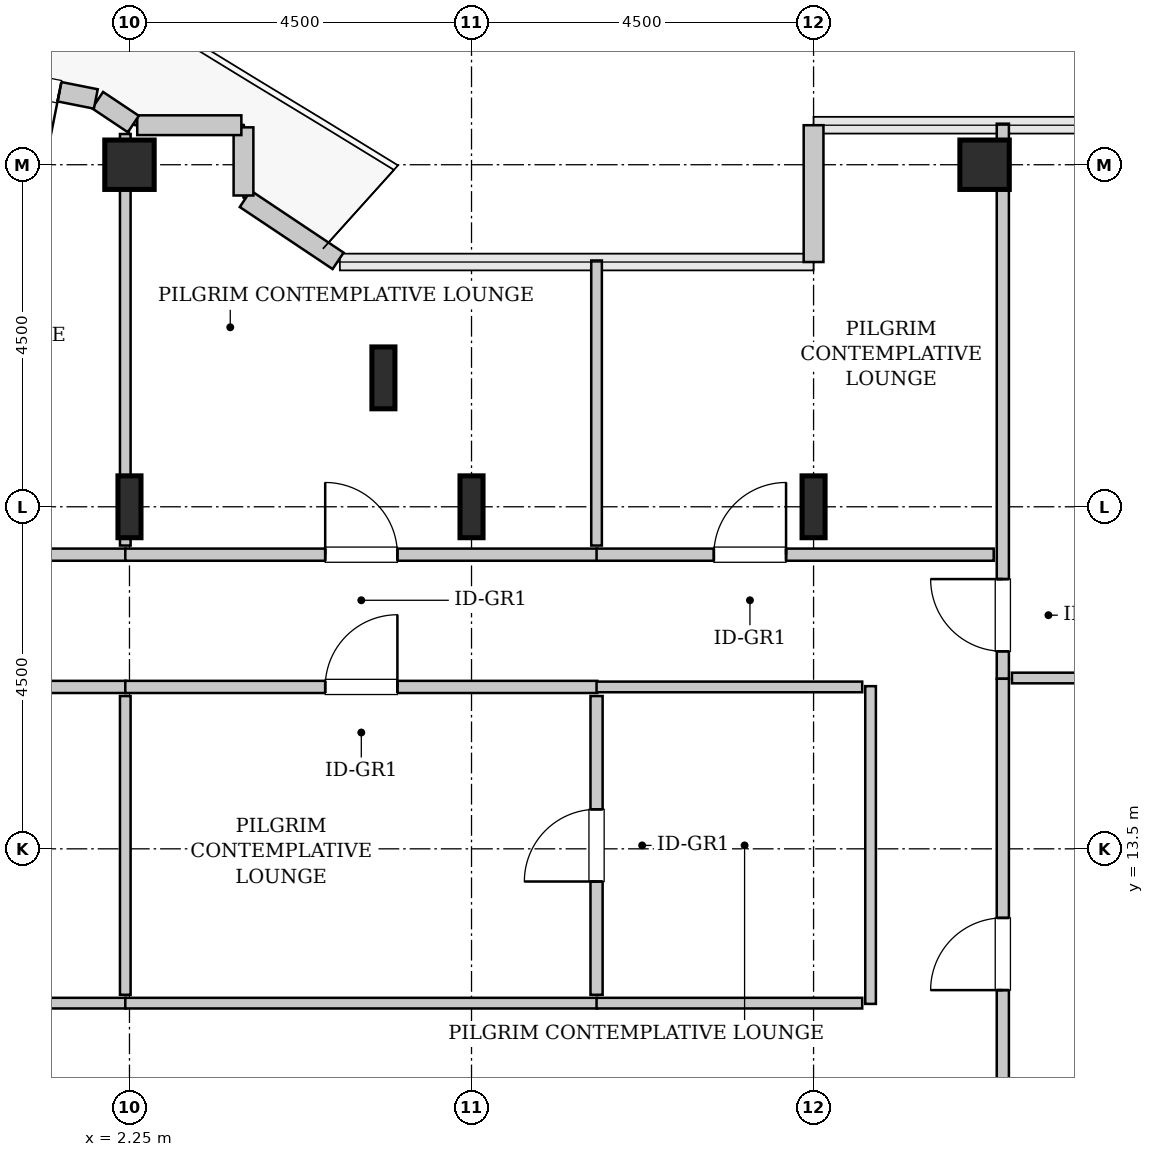
"""IFC4 building model, lengths in metres.
Left out: names, types, materials, properties, quantities, classifications, styles, units other than length and angle.
Written with IfcOpenShell. Run it as: python <this file> out.ifc"""

import sys

from ifc_helpers import new_model, si_unit, direction, frame, frame_2d, origin, origin_2d, place, context, subcontext, project, spatial, rectangle, hollow_rectangle, i_section, extrude, source, transform, mapped, element, fill, save


model = new_model("IFC4")
c1 = context("Model", 3, precision=1e-05, world=origin(), true_north=direction((0.0, 1.0)))
c2 = subcontext(c1, "Body", "Model", "MODEL_VIEW")
j1 = project(units=[si_unit("LENGTHUNIT", "METRE"), si_unit("PLANEANGLEUNIT", "RADIAN")], contexts=[c1])
p1 = place(None, origin())
s1 = spatial("IfcSite", under=j1, at=p1, CompositionType="ELEMENT")
p2 = place(p1, origin())
s2 = spatial("IfcBuilding", under=s1, at=p2, CompositionType="ELEMENT")
p3 = place(p2, frame((0.0, 0.0, 248.4)))
s3 = spatial("IfcBuildingStorey", under=s2, at=p3, CompositionType="ELEMENT", Elevation=248.4)
m1 = source(origin(), c2, "Body", "SweptSolid", [
    extrude(i_section(OverallWidth=0.303, OverallDepth=0.814, WebThickness=0.021, FlangeThickness=0.04, FilletRadius=0.03, at=origin_2d()), origin(), (0.0, 0.0, 1.0), 3.8),
])
p4 = place(p3, frame((2.25, 18.0, 0.0), z_axis=(0.0, 0.0, 1.0), x_axis=(1.0, 0.0, 0.0)))
e1 = element("IfcColumn", 1, at=p4, inside=s3, PredefinedType="COLUMN", context=c2, shape_type="MappedRepresentation", body=[
    mapped(m1, transform((0.0, 0.0, 0.0), x_axis=(1.0, 0.0, 0.0), y_axis=(0.0, 1.0, 0.0), z_axis=(0.0, 0.0, 1.0), scale=1.0)),
])
m2 = source(origin(), c2, "Body", "SweptSolid", [
    extrude(hollow_rectangle(XDim=0.65, YDim=0.65, WallThickness=0.032, InnerFilletRadius=0.032, OuterFilletRadius=0.064, at=origin_2d()), origin(), (0.0, 0.0, 1.0), 3.8),
])
p5 = place(p3, frame((2.25, 22.5, 0.0), z_axis=(0.0, 0.0, 1.0), x_axis=(1.0, 0.0, 0.0)))
e2 = element("IfcColumn", 2, at=p5, inside=s3, PredefinedType="COLUMN", context=c2, shape_type="MappedRepresentation", body=[
    mapped(m2, transform((0.0, 0.0, 0.0), x_axis=(1.0, 0.0, 0.0), y_axis=(0.0, 1.0, 0.0), z_axis=(0.0, 0.0, 1.0), scale=1.0)),
])
for number, where, z_axis, x_axis in (
    (3, (5.591, 19.696, 0.0), (0.0, 0.0, 1.0), (1.0, 0.0, 0.0)),
    (4, (6.75, 18.0, 0.0), (0.0, 0.0, 1.0), (1.0, 0.0, 0.0)),
    (5, (11.25, 18.0, 0.0), (0.0, 0.0, 1.0), (1.0, 0.0, 0.0)),
):
    element("IfcColumn", number, at=place(p3, frame(where, z_axis=z_axis, x_axis=x_axis)), inside=s3, PredefinedType="COLUMN", context=c2, shape_type="MappedRepresentation", body=[
        mapped(m1, transform((0.0, 0.0, 0.0), x_axis=(1.0, 0.0, 0.0), y_axis=(0.0, 1.0, 0.0), z_axis=(0.0, 0.0, 1.0), scale=1.0)),
    ])
p6 = place(p3, frame((13.5, 22.5, 0.0), z_axis=(0.0, 0.0, 1.0), x_axis=(1.0, 0.0, 0.0)))
e6 = element("IfcColumn", 6, at=p6, inside=s3, PredefinedType="COLUMN", context=c2, shape_type="MappedRepresentation", body=[
    mapped(m2, transform((0.0, 0.0, 0.0), x_axis=(1.0, 0.0, 0.0), y_axis=(0.0, 1.0, 0.0), z_axis=(0.0, 0.0, 1.0), scale=1.0)),
])
m3 = source(origin(), c2, "Body", "SweptSolid", [
    extrude(rectangle(XDim=1.8, YDim=0.26, at=frame_2d((0.9, 0.0))), origin(), (0.0, 0.0, 1.0), 3.55),
])
p7 = place(p3, frame((11.25, 23.02, 0.0), z_axis=(0.0, 0.0, 1.0), x_axis=(0.0, -1.0, 0.0)))
e7 = element("IfcWall", 7, at=p7, inside=s3, PredefinedType="SOLIDWALL", context=c2, shape_type="MappedRepresentation", body=[
    mapped(m3, transform((0.0, 0.0, 0.0), x_axis=(1.0, 0.0, 0.0), y_axis=(0.0, 1.0, 0.0), z_axis=(0.0, 0.0, 1.0), scale=1.0)),
])
m4 = source(origin(), c2, "Body", "SweptSolid", [
    extrude(rectangle(XDim=1.469, YDim=0.26, at=frame_2d((0.734, 0.0))), origin(), (0.0, 0.0, 1.0), 3.55),
])
p8 = place(p3, frame((4.995, 21.236, 0.0), z_axis=(0.0, 0.0, 1.0), x_axis=(-0.831461760506, 0.555581983884, 0.0)))
e8 = element("IfcWall", 8, at=p8, inside=s3, PredefinedType="SOLIDWALL", context=c2, shape_type="MappedRepresentation", body=[
    mapped(m4, transform((0.0, 0.0, 0.0), x_axis=(1.0, 0.0, 0.0), y_axis=(0.0, 1.0, 0.0), z_axis=(0.0, 0.0, 1.0), scale=1.0)),
])
m5 = source(origin(), c2, "Body", "SweptSolid", [
    extrude(rectangle(XDim=0.897, YDim=0.26, at=frame_2d((0.448, 0.0))), origin(), (0.0, 0.0, 1.0), 3.55),
])
p9 = place(p3, frame((3.75, 22.095, 0.0), z_axis=(0.0, 0.0, 1.0), x_axis=(0.0, 1.0, 0.0)))
e9 = element("IfcWall", 9, at=p9, inside=s3, PredefinedType="SOLIDWALL", context=c2, shape_type="MappedRepresentation", body=[
    mapped(m5, transform((0.0, 0.0, 0.0), x_axis=(1.0, 0.0, 0.0), y_axis=(0.0, 1.0, 0.0), z_axis=(0.0, 0.0, 1.0), scale=1.0)),
])
m6 = source(origin(), c2, "Body", "SweptSolid", [
    extrude(rectangle(XDim=1.37, YDim=0.26, at=frame_2d((0.685, 0.0))), origin(), (0.0, 0.0, 1.0), 3.55),
])
p10 = place(p3, frame((3.722, 23.02, 0.0), z_axis=(0.0, 0.0, 1.0), x_axis=(-1.0, 0.0, 0.0)))
e10 = element("IfcWall", 10, at=p10, inside=s3, PredefinedType="SOLIDWALL", context=c2, shape_type="MappedRepresentation", body=[
    mapped(m6, transform((0.0, 0.0, 0.0), x_axis=(1.0, 0.0, 0.0), y_axis=(0.0, 1.0, 0.0), z_axis=(0.0, 0.0, 1.0), scale=1.0)),
])
m7 = source(origin(), c2, "Body", "SweptSolid", [
    extrude(rectangle(XDim=0.565, YDim=0.26, at=frame_2d((0.283, 0.0))), origin(), (0.0, 0.0, 1.0), 3.55),
])
p11 = place(p3, frame((2.301, 23.036, 0.0), z_axis=(0.0, 0.0, 1.0), x_axis=(-0.831651492666, 0.555297933317, 0.0)))
e11 = element("IfcWall", 11, at=p11, inside=s3, PredefinedType="SOLIDWALL", context=c2, shape_type="MappedRepresentation", body=[
    mapped(m7, transform((0.0, 0.0, 0.0), x_axis=(1.0, 0.0, 0.0), y_axis=(0.0, 1.0, 0.0), z_axis=(0.0, 0.0, 1.0), scale=1.0)),
])
m8 = source(origin(), c2, "Body", "SweptSolid", [
    extrude(rectangle(XDim=4.137, YDim=0.26, at=frame_2d((2.068, 0.0))), origin(), (0.0, 0.0, 1.0), 3.55),
])
p12 = place(p3, frame((1.807, 23.365, 0.0), z_axis=(0.0, 0.0, 1.0), x_axis=(-0.980782170794, 0.195105954428, 0.0)))
e12 = element("IfcWall", 12, at=p12, inside=s3, PredefinedType="SOLIDWALL", context=c2, shape_type="MappedRepresentation", body=[
    mapped(m8, transform((0.0, 0.0, 0.0), x_axis=(1.0, 0.0, 0.0), y_axis=(0.0, 1.0, 0.0), z_axis=(0.0, 0.0, 1.0), scale=1.0)),
])
p13 = place(p12, frame((0.488, 0.0, 0.0)))
e13 = element("IfcOpeningElement", 13, at=p13, cuts=e12, PredefinedType="OPENING", context=c2, shape_type="SweptSolid", body=[
    extrude(rectangle(XDim=1.1, YDim=2.2, at=frame_2d((0.55, 1.1))), frame((0.0, 0.14, 0.0), z_axis=(0.0, -1.0, 0.0), x_axis=(1.0, 0.0, 0.0)), (0.0, 0.0, 1.0), 0.28),
])
m9 = source(origin(), c2, "Body", "SweptSolid", [
    extrude(rectangle(XDim=7.302, YDim=0.16, at=frame_2d((3.651, 0.0))), origin(), (0.0, 0.0, 1.0), 3.535),
])
p14 = place(p3, frame((13.74, 15.738, 0.0), z_axis=(0.0, 0.0, 1.0), x_axis=(0.0, 1.0, 0.0)))
e14 = element("IfcWall", 14, at=p14, inside=s3, PredefinedType="PARTITIONING", context=c2, shape_type="MappedRepresentation", body=[
    mapped(m9, transform((0.0, 0.0, 0.0), x_axis=(1.0, 0.0, 0.0), y_axis=(0.0, 1.0, 0.0), z_axis=(0.0, 0.0, 1.0), scale=1.0)),
])
p15 = place(p14, frame((0.361, 0.0, 0.0)))
e15 = element("IfcOpeningElement", 15, at=p15, cuts=e14, PredefinedType="OPENING", context=c2, shape_type="SweptSolid", body=[
    extrude(rectangle(XDim=0.95, YDim=2.1, at=frame_2d((0.475, 1.05))), frame((0.0, 0.09, 0.0), z_axis=(0.0, -1.0, 0.0), x_axis=(1.0, 0.0, 0.0)), (0.0, 0.0, 1.0), 0.18),
])
m10 = source(origin(), c2, "Body", "SweptSolid", [
    extrude(rectangle(XDim=11.43, YDim=0.14, at=frame_2d((5.715, 0.0))), origin(), (0.0, 0.0, 1.0), 3.535),
])
p16 = place(p3, frame((13.86, 15.748, 0.0), z_axis=(0.0, 0.0, 1.0), x_axis=(1.0, 0.0, 0.0)))
e16 = element("IfcWall", 16, at=p16, inside=s3, PredefinedType="PARTITIONING", context=c2, shape_type="MappedRepresentation", body=[
    mapped(m10, transform((0.0, 0.0, 0.0), x_axis=(1.0, 0.0, 0.0), y_axis=(0.0, 1.0, 0.0), z_axis=(0.0, 0.0, 1.0), scale=1.0)),
])
m11 = source(origin(), c2, "Body", "SweptSolid", [
    extrude(rectangle(XDim=7.242, YDim=0.16, at=frame_2d((3.621, 0.0))), origin(), (0.0, 0.0, 1.0), 3.535),
])
p17 = place(p3, frame((13.74, 8.495, 0.0), z_axis=(0.0, 0.0, 1.0), x_axis=(0.0, 1.0, 0.0)))
e17 = element("IfcWall", 17, at=p17, inside=s3, PredefinedType="PARTITIONING", context=c2, shape_type="MappedRepresentation", body=[
    mapped(m11, transform((0.0, 0.0, 0.0), x_axis=(1.0, 0.0, 0.0), y_axis=(0.0, 1.0, 0.0), z_axis=(0.0, 0.0, 1.0), scale=1.0)),
])
p18 = place(p17, frame((3.146, 0.0, 0.0)))
e18 = element("IfcOpeningElement", 18, at=p18, cuts=e17, PredefinedType="OPENING", context=c2, shape_type="SweptSolid", body=[
    extrude(rectangle(XDim=0.95, YDim=2.1, at=frame_2d((0.475, 1.05))), frame((0.0, 0.09, 0.0), z_axis=(0.0, -1.0, 0.0), x_axis=(1.0, 0.0, 0.0)), (0.0, 0.0, 1.0), 0.18),
])
m12 = source(origin(), c2, "Body", "SweptSolid", [
    extrude(rectangle(XDim=7.21, YDim=0.16, at=frame_2d((3.605, 0.0))), origin(), (0.0, 0.0, 1.0), 3.535),
])
p19 = place(p3, frame((-5.005, 17.37, 0.0), z_axis=(0.0, 0.0, 1.0), x_axis=(1.0, 0.0, 0.0)))
e19 = element("IfcWall", 19, at=p19, inside=s3, PredefinedType="PARTITIONING", context=c2, shape_type="MappedRepresentation", body=[
    mapped(m12, transform((0.0, 0.0, 0.0), x_axis=(1.0, 0.0, 0.0), y_axis=(0.0, 1.0, 0.0), z_axis=(0.0, 0.0, 1.0), scale=1.0)),
])
p20 = place(p19, frame((3.13, 0.0, 0.0)))
e20 = element("IfcOpeningElement", 20, at=p20, cuts=e19, PredefinedType="OPENING", context=c2, shape_type="SweptSolid", body=[
    extrude(rectangle(XDim=0.95, YDim=2.1, at=frame_2d((0.475, 1.05))), frame((0.0, 0.09, 0.0), z_axis=(0.0, -1.0, 0.0), x_axis=(1.0, 0.0, 0.0)), (0.0, 0.0, 1.0), 0.18),
])
m13 = source(origin(), c2, "Body", "SweptSolid", [
    extrude(rectangle(XDim=5.414, YDim=0.14, at=frame_2d((2.707, 0.0))), origin(), (0.0, 0.0, 1.0), 2.925),
])
p21 = place(p3, frame((2.195, 17.49, 0.0), z_axis=(0.0, 0.0, 1.0), x_axis=(0.0, 1.0, 0.0)))
e21 = element("IfcWall", 21, at=p21, inside=s3, PredefinedType="PARTITIONING", context=c2, shape_type="MappedRepresentation", body=[
    mapped(m13, transform((0.0, 0.0, 0.0), x_axis=(1.0, 0.0, 0.0), y_axis=(0.0, 1.0, 0.0), z_axis=(0.0, 0.0, 1.0), scale=1.0)),
])
p22 = place(p3, frame((-5.005, 15.63, 0.0), z_axis=(0.0, 0.0, 1.0), x_axis=(1.0, 0.0, 0.0)))
e22 = element("IfcWall", 22, at=p22, inside=s3, PredefinedType="PARTITIONING", context=c2, shape_type="MappedRepresentation", body=[
    mapped(m12, transform((0.0, 0.0, 0.0), x_axis=(1.0, 0.0, 0.0), y_axis=(0.0, 1.0, 0.0), z_axis=(0.0, 0.0, 1.0), scale=1.0)),
])
p23 = place(p22, frame((3.13, 0.0, 0.0)))
e23 = element("IfcOpeningElement", 23, at=p23, cuts=e22, PredefinedType="OPENING", context=c2, shape_type="SweptSolid", body=[
    extrude(rectangle(XDim=0.95, YDim=2.1, at=frame_2d((0.475, 1.05))), frame((0.0, 0.09, 0.0), z_axis=(0.0, -1.0, 0.0), x_axis=(1.0, 0.0, 0.0)), (0.0, 0.0, 1.0), 0.18),
])
m14 = source(origin(), c2, "Body", "SweptSolid", [
    extrude(rectangle(XDim=7.21, YDim=0.14, at=frame_2d((3.605, 0.0))), origin(), (0.0, 0.0, 1.0), 3.535),
])
p24 = place(p3, frame((-5.005, 11.47, 0.0), z_axis=(0.0, 0.0, 1.0), x_axis=(1.0, 0.0, 0.0)))
e24 = element("IfcWall", 24, at=p24, inside=s3, PredefinedType="PARTITIONING", context=c2, shape_type="MappedRepresentation", body=[
    mapped(m14, transform((0.0, 0.0, 0.0), x_axis=(1.0, 0.0, 0.0), y_axis=(0.0, 1.0, 0.0), z_axis=(0.0, 0.0, 1.0), scale=1.0)),
])
m15 = source(origin(), c2, "Body", "SweptSolid", [
    extrude(rectangle(XDim=3.93, YDim=0.14, at=frame_2d((1.965, 0.0))), origin(), (0.0, 0.0, 1.0), 3.535),
])
p25 = place(p3, frame((2.195, 11.58, 0.0), z_axis=(0.0, 0.0, 1.0), x_axis=(0.0, 1.0, 0.0)))
e25 = element("IfcWall", 25, at=p25, inside=s3, PredefinedType="PARTITIONING", context=c2, shape_type="MappedRepresentation", body=[
    mapped(m15, transform((0.0, 0.0, 0.0), x_axis=(1.0, 0.0, 0.0), y_axis=(0.0, 1.0, 0.0), z_axis=(0.0, 0.0, 1.0), scale=1.0)),
])
m16 = source(origin(), c2, "Body", "SweptSolid", [
    extrude(rectangle(XDim=6.21, YDim=0.16, at=frame_2d((3.105, 0.0))), origin(), (0.0, 0.0, 1.0), 3.535),
])
p26 = place(p3, frame((2.195, 17.37, 0.0), z_axis=(0.0, 0.0, 1.0), x_axis=(1.0, 0.0, 0.0)))
e26 = element("IfcWall", 26, at=p26, inside=s3, PredefinedType="PARTITIONING", context=c2, shape_type="MappedRepresentation", body=[
    mapped(m16, transform((0.0, 0.0, 0.0), x_axis=(1.0, 0.0, 0.0), y_axis=(0.0, 1.0, 0.0), z_axis=(0.0, 0.0, 1.0), scale=1.0)),
])
p27 = place(p26, frame((2.63, 0.0, 0.0)))
e27 = element("IfcOpeningElement", 27, at=p27, cuts=e26, PredefinedType="OPENING", context=c2, shape_type="SweptSolid", body=[
    extrude(rectangle(XDim=0.95, YDim=2.1, at=frame_2d((0.475, 1.05))), frame((0.0, 0.09, 0.0), z_axis=(0.0, -1.0, 0.0), x_axis=(1.0, 0.0, 0.0)), (0.0, 0.0, 1.0), 0.18),
])
m17 = source(origin(), c2, "Body", "SweptSolid", [
    extrude(rectangle(XDim=3.75, YDim=0.14, at=frame_2d((1.875, 0.0))), origin(), (0.0, 0.0, 1.0), 3.535),
])
p28 = place(p3, frame((8.395, 17.49, 0.0), z_axis=(0.0, 0.0, 1.0), x_axis=(0.0, 1.0, 0.0)))
e28 = element("IfcWall", 28, at=p28, inside=s3, PredefinedType="PARTITIONING", context=c2, shape_type="MappedRepresentation", body=[
    mapped(m17, transform((0.0, 0.0, 0.0), x_axis=(1.0, 0.0, 0.0), y_axis=(0.0, 1.0, 0.0), z_axis=(0.0, 0.0, 1.0), scale=1.0)),
])
p29 = place(p3, frame((2.195, 15.63, 0.0), z_axis=(0.0, 0.0, 1.0), x_axis=(1.0, 0.0, 0.0)))
e29 = element("IfcWall", 29, at=p29, inside=s3, PredefinedType="PARTITIONING", context=c2, shape_type="MappedRepresentation", body=[
    mapped(m16, transform((0.0, 0.0, 0.0), x_axis=(1.0, 0.0, 0.0), y_axis=(0.0, 1.0, 0.0), z_axis=(0.0, 0.0, 1.0), scale=1.0)),
])
p30 = place(p29, frame((2.63, 0.0, 0.0)))
e30 = element("IfcOpeningElement", 30, at=p30, cuts=e29, PredefinedType="OPENING", context=c2, shape_type="SweptSolid", body=[
    extrude(rectangle(XDim=0.95, YDim=2.1, at=frame_2d((0.475, 1.05))), frame((0.0, 0.09, 0.0), z_axis=(0.0, -1.0, 0.0), x_axis=(1.0, 0.0, 0.0)), (0.0, 0.0, 1.0), 0.18),
])
m18 = source(origin(), c2, "Body", "SweptSolid", [
    extrude(rectangle(XDim=6.21, YDim=0.14, at=frame_2d((3.105, 0.0))), origin(), (0.0, 0.0, 1.0), 3.535),
])
p31 = place(p3, frame((2.195, 11.47, 0.0), z_axis=(0.0, 0.0, 1.0), x_axis=(1.0, 0.0, 0.0)))
e31 = element("IfcWall", 31, at=p31, inside=s3, PredefinedType="PARTITIONING", context=c2, shape_type="MappedRepresentation", body=[
    mapped(m18, transform((0.0, 0.0, 0.0), x_axis=(1.0, 0.0, 0.0), y_axis=(0.0, 1.0, 0.0), z_axis=(0.0, 0.0, 1.0), scale=1.0)),
])
m19 = source(origin(), c2, "Body", "SweptSolid", [
    extrude(rectangle(XDim=3.93, YDim=0.16, at=frame_2d((1.965, 0.0))), origin(), (0.0, 0.0, 1.0), 3.535),
])
p32 = place(p3, frame((8.395, 11.58, 0.0), z_axis=(0.0, 0.0, 1.0), x_axis=(0.0, 1.0, 0.0)))
e32 = element("IfcWall", 32, at=p32, inside=s3, PredefinedType="PARTITIONING", context=c2, shape_type="MappedRepresentation", body=[
    mapped(m19, transform((0.0, 0.0, 0.0), x_axis=(1.0, 0.0, 0.0), y_axis=(0.0, 1.0, 0.0), z_axis=(0.0, 0.0, 1.0), scale=1.0)),
])
p33 = place(p32, frame((1.49, 0.0, 0.0)))
e33 = element("IfcOpeningElement", 33, at=p33, cuts=e32, PredefinedType="OPENING", context=c2, shape_type="SweptSolid", body=[
    extrude(rectangle(XDim=0.95, YDim=2.1, at=frame_2d((0.475, 1.05))), frame((0.0, 0.09, 0.0), z_axis=(0.0, -1.0, 0.0), x_axis=(1.0, 0.0, 0.0)), (0.0, 0.0, 1.0), 0.18),
])
m20 = source(origin(), c2, "Body", "SweptSolid", [
    extrude(rectangle(XDim=5.225, YDim=0.16, at=frame_2d((2.613, 0.0))), origin(), (0.0, 0.0, 1.0), 3.535),
])
p34 = place(p3, frame((8.395, 17.37, 0.0), z_axis=(0.0, 0.0, 1.0), x_axis=(1.0, 0.0, 0.0)))
e34 = element("IfcWall", 34, at=p34, inside=s3, PredefinedType="PARTITIONING", context=c2, shape_type="MappedRepresentation", body=[
    mapped(m20, transform((0.0, 0.0, 0.0), x_axis=(1.0, 0.0, 0.0), y_axis=(0.0, 1.0, 0.0), z_axis=(0.0, 0.0, 1.0), scale=1.0)),
])
p35 = place(p34, frame((1.543, 0.0, 0.0)))
e35 = element("IfcOpeningElement", 35, at=p35, cuts=e34, PredefinedType="OPENING", context=c2, shape_type="SweptSolid", body=[
    extrude(rectangle(XDim=0.95, YDim=2.1, at=frame_2d((0.475, 1.05))), frame((0.0, 0.09, 0.0), z_axis=(0.0, -1.0, 0.0), x_axis=(1.0, 0.0, 0.0)), (0.0, 0.0, 1.0), 0.18),
])
m21 = source(origin(), c2, "Body", "SweptSolid", [
    extrude(rectangle(XDim=4.18, YDim=0.14, at=frame_2d((2.09, 0.0))), origin(), (0.0, 0.0, 1.0), 3.535),
])
p36 = place(p3, frame((12.0, 11.46, 0.0), z_axis=(0.0, 0.0, 1.0), x_axis=(0.0, 1.0, 0.0)))
e36 = element("IfcWall", 36, at=p36, inside=s3, PredefinedType="PARTITIONING", context=c2, shape_type="MappedRepresentation", body=[
    mapped(m21, transform((0.0, 0.0, 0.0), x_axis=(1.0, 0.0, 0.0), y_axis=(0.0, 1.0, 0.0), z_axis=(0.0, 0.0, 1.0), scale=1.0)),
])
m22 = source(origin(), c2, "Body", "SweptSolid", [
    extrude(rectangle(XDim=3.495, YDim=0.14, at=frame_2d((1.748, 0.0))), origin(), (0.0, 0.0, 1.0), 3.535),
])
for number, where, z_axis, x_axis in (
    (37, (8.395, 15.63, 0.0), (0.0, 0.0, 1.0), (1.0, 0.0, 0.0)),
    (38, (8.395, 11.47, 0.0), (0.0, 0.0, 1.0), (1.0, 0.0, 0.0)),
):
    element("IfcWall", number, at=place(p3, frame(where, z_axis=z_axis, x_axis=x_axis)), inside=s3, PredefinedType="PARTITIONING", context=c2, shape_type="MappedRepresentation", body=[
        mapped(m22, transform((0.0, 0.0, 0.0), x_axis=(1.0, 0.0, 0.0), y_axis=(0.0, 1.0, 0.0), z_axis=(0.0, 0.0, 1.0), scale=1.0)),
    ])
m23 = source(origin(), c2, "Body", "SweptSolid", [
    extrude(rectangle(XDim=1.1, YDim=2.2, at=frame_2d((0.55, 1.1))), frame((0.0, 0.025, 0.0), z_axis=(0.0, -1.0, 0.0), x_axis=(1.0, 0.0, 0.0)), (0.0, 0.0, 1.0), 0.05),
])
p37 = place(p13, origin())
e39 = element("IfcDoor", 39, at=p37, inside=s3, OperationType="SINGLE_SWING_LEFT", PredefinedType="DOOR", context=c2, shape_type="MappedRepresentation", body=[
    mapped(m23, transform((0.0, 0.0, 0.0), x_axis=(1.0, 0.0, 0.0), y_axis=(0.0, 1.0, 0.0), z_axis=(0.0, 0.0, 1.0), scale=1.0)),
])
fill(e13, e39)
m24 = source(origin(), c2, "Body", "SweptSolid", [
    extrude(rectangle(XDim=0.95, YDim=2.1, at=frame_2d((0.475, 1.05))), frame((0.0, 0.025, 0.0), z_axis=(0.0, -1.0, 0.0), x_axis=(1.0, 0.0, 0.0)), (0.0, 0.0, 1.0), 0.05),
])
p38 = place(p15, origin())
e40 = element("IfcDoor", 40, at=p38, inside=s3, OperationType="SINGLE_SWING_RIGHT", PredefinedType="DOOR", context=c2, shape_type="MappedRepresentation", body=[
    mapped(m24, transform((0.0, 0.0, 0.0), x_axis=(1.0, 0.0, 0.0), y_axis=(0.0, 1.0, 0.0), z_axis=(0.0, 0.0, 1.0), scale=1.0)),
])
fill(e15, e40)
p39 = place(p18, origin())
e41 = element("IfcDoor", 41, at=p39, inside=s3, OperationType="SINGLE_SWING_LEFT", PredefinedType="DOOR", context=c2, shape_type="MappedRepresentation", body=[
    mapped(m24, transform((0.0, 0.0, 0.0), x_axis=(1.0, 0.0, 0.0), y_axis=(0.0, 1.0, 0.0), z_axis=(0.0, 0.0, 1.0), scale=1.0)),
])
fill(e18, e41)
p40 = place(p27, origin())
e42 = element("IfcDoor", 42, at=p40, inside=s3, OperationType="SINGLE_SWING_LEFT", PredefinedType="DOOR", context=c2, shape_type="MappedRepresentation", body=[
    mapped(m24, transform((0.0, 0.0, 0.0), x_axis=(1.0, 0.0, 0.0), y_axis=(0.0, 1.0, 0.0), z_axis=(0.0, 0.0, 1.0), scale=1.0)),
])
fill(e27, e42)
p41 = place(p30, origin())
e43 = element("IfcDoor", 43, at=p41, inside=s3, OperationType="SINGLE_SWING_RIGHT", PredefinedType="DOOR", context=c2, shape_type="MappedRepresentation", body=[
    mapped(m24, transform((0.0, 0.0, 0.0), x_axis=(1.0, 0.0, 0.0), y_axis=(0.0, 1.0, 0.0), z_axis=(0.0, 0.0, 1.0), scale=1.0)),
])
fill(e30, e43)
p42 = place(p33, origin())
e44 = element("IfcDoor", 44, at=p42, inside=s3, OperationType="SINGLE_SWING_LEFT", PredefinedType="DOOR", context=c2, shape_type="MappedRepresentation", body=[
    mapped(m24, transform((0.0, 0.0, 0.0), x_axis=(1.0, 0.0, 0.0), y_axis=(0.0, 1.0, 0.0), z_axis=(0.0, 0.0, 1.0), scale=1.0)),
])
fill(e33, e44)
p43 = place(p35, origin())
e45 = element("IfcDoor", 45, at=p43, inside=s3, OperationType="SINGLE_SWING_RIGHT", PredefinedType="DOOR", context=c2, shape_type="MappedRepresentation", body=[
    mapped(m24, transform((0.0, 0.0, 0.0), x_axis=(1.0, 0.0, 0.0), y_axis=(0.0, 1.0, 0.0), z_axis=(0.0, 0.0, 1.0), scale=1.0)),
])
fill(e35, e45)
save(model, sys.argv[1])
